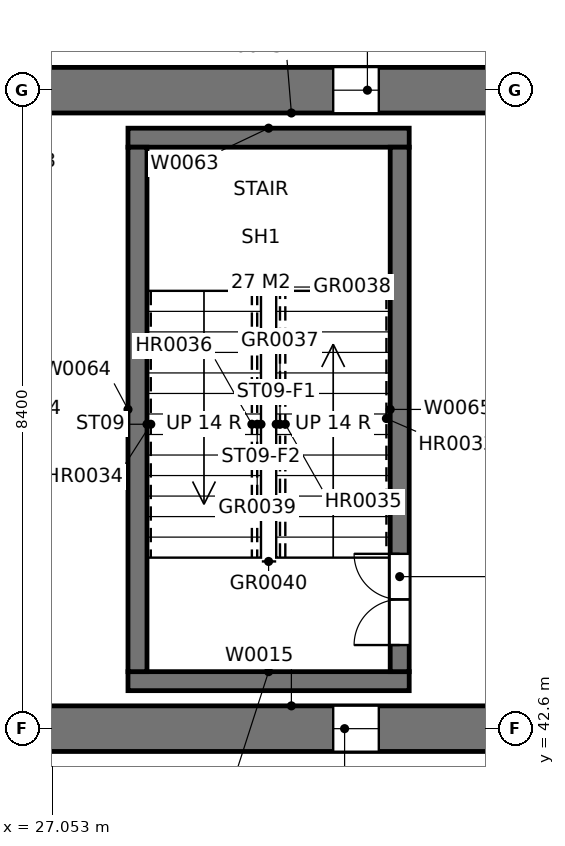
"""IFC4 building model, lengths in metres.
Left out: names, types, materials, properties, quantities, classifications, styles, units other than length and angle.
Written with IfcOpenShell. Run it as: python <this file> out.ifc"""

import sys

from ifc_helpers import new_model, si_unit, direction, frame, frame_2d, origin, place, context, subcontext, project, spatial, rectangle, extrude, element, fill, save


model = new_model("IFC4")
c1 = context("Model", 3, precision=1e-05, world=origin(), true_north=direction((0.0, 1.0)))
c2 = subcontext(c1, "Body", "Model", "MODEL_VIEW")
j1 = project(units=[si_unit("LENGTHUNIT", "METRE"), si_unit("PLANEANGLEUNIT", "RADIAN")], contexts=[c1])
p1 = place(None, origin())
s1 = spatial("IfcSite", under=j1, at=p1, CompositionType="ELEMENT")
p2 = place(p1, origin())
s2 = spatial("IfcBuilding", under=s1, at=p2, CompositionType="ELEMENT")
p3 = place(p2, frame((0.0, 0.0, 14.4)))
s3 = spatial("IfcBuildingStorey", under=s2, at=p3, CompositionType="ELEMENT", Elevation=14.4)
p4 = place(p3, frame((33.9, 51.0, 0.0), z_axis=(0.0, 0.0, 1.0), x_axis=(-1.0, 0.0, 0.0)))
e1 = element("IfcWall", 1, at=p4, inside=s3, PredefinedType="SOLIDWALL", context=c2, shape_type="SweptSolid", body=[
    extrude(rectangle(XDim=7.4, YDim=0.6, at=frame_2d((3.7, 0.0))), origin(), (0.0, 0.0, 1.0), 4.8),
])
p5 = place(p4, frame((2.55, 0.0, 1.5)))
e2 = element("IfcOpeningElement", 2, at=p5, cuts=e1, PredefinedType="OPENING", context=c2, shape_type="SweptSolid", body=[
    extrude(rectangle(XDim=0.6, YDim=1.8, at=frame_2d((0.3, 0.9))), frame((0.0, 0.31, 0.0), z_axis=(0.0, -1.0, 0.0), x_axis=(1.0, 0.0, 0.0)), (0.0, 0.0, 1.0), 0.62),
])
p6 = place(p3, frame((26.5, 42.6, 0.0), z_axis=(0.0, 0.0, 1.0), x_axis=(1.0, 0.0, 0.0)))
e3 = element("IfcWall", 3, at=p6, inside=s3, PredefinedType="SOLIDWALL", context=c2, shape_type="SweptSolid", body=[
    extrude(rectangle(XDim=7.4, YDim=0.6, at=frame_2d((3.7, 0.0))), origin(), (0.0, 0.0, 1.0), 4.8),
])
p7 = place(p6, frame((4.25, 0.0, 1.5)))
e4 = element("IfcOpeningElement", 4, at=p7, cuts=e3, PredefinedType="OPENING", context=c2, shape_type="SweptSolid", body=[
    extrude(rectangle(XDim=0.6, YDim=1.8, at=frame_2d((0.3, 0.9))), frame((0.0, 0.31, 0.0), z_axis=(0.0, -1.0, 0.0), x_axis=(1.0, 0.0, 0.0)), (0.0, 0.0, 1.0), 0.62),
])
for number, where, z_axis, x_axis in (
    (5, (28.05, 43.225, 0.0), (0.0, 0.0, 1.0), (1.0, 0.0, 0.0)),
    (6, (28.05, 50.375, 0.0), (0.0, 0.0, 1.0), (1.0, 0.0, 0.0)),
):
    element("IfcWall", number, at=place(p3, frame(where, z_axis=z_axis, x_axis=x_axis)), inside=s3, PredefinedType="SOLIDWALL", context=c2, shape_type="SweptSolid", body=[
        extrude(rectangle(XDim=3.7, YDim=0.25, at=frame_2d((1.85, 0.0))), origin(), (0.0, 0.0, 1.0), 4.8),
    ])
p8 = place(p3, frame((28.175, 43.35, 0.0), z_axis=(0.0, 0.0, 1.0), x_axis=(0.0, 1.0, 0.0)))
e7 = element("IfcWall", 7, at=p8, inside=s3, PredefinedType="SOLIDWALL", context=c2, shape_type="SweptSolid", body=[
    extrude(rectangle(XDim=6.9, YDim=0.25, at=frame_2d((3.45, 0.0))), origin(), (0.0, 0.0, 1.0), 4.8),
])
p9 = place(p3, frame((31.625, 43.35, 0.0), z_axis=(0.0, 0.0, 1.0), x_axis=(0.0, 1.0, 0.0)))
e8 = element("IfcWall", 8, at=p9, inside=s3, PredefinedType="SOLIDWALL", context=c2, shape_type="SweptSolid", body=[
    extrude(rectangle(XDim=6.9, YDim=0.25, at=frame_2d((3.45, 0.0))), origin(), (0.0, 0.0, 1.0), 4.8),
])
p10 = place(p9, frame((0.35, 0.0, 0.0)))
e9 = element("IfcOpeningElement", 9, at=p10, cuts=e8, PredefinedType="OPENING", context=c2, shape_type="SweptSolid", body=[
    extrude(rectangle(XDim=1.2, YDim=2.1, at=frame_2d((0.6, 1.05))), frame((0.0, 0.135, 0.0), z_axis=(0.0, -1.0, 0.0), x_axis=(1.0, 0.0, 0.0)), (0.0, 0.0, 1.0), 0.27),
])
p11 = place(p10, origin())
e10 = element("IfcDoor", 10, at=p11, inside=s3, OperationType="DOUBLE_DOOR_SINGLE_SWING", PredefinedType="DOOR", context=c2, shape_type="SweptSolid", body=[
    extrude(rectangle(XDim=1.2, YDim=2.1, at=frame_2d((0.6, 1.05))), frame((0.0, 0.025, 0.0), z_axis=(0.0, -1.0, 0.0), x_axis=(1.0, 0.0, 0.0)), (0.0, 0.0, 1.0), 0.05),
])
fill(e9, e10)
p12 = place(p5, origin())
e11 = element("IfcWindow", 11, at=p12, inside=s3, PartitioningType="SINGLE_PANEL", PredefinedType="WINDOW", context=c2, shape_type="SweptSolid", body=[
    extrude(rectangle(XDim=0.6, YDim=1.8, at=frame_2d((0.3, 0.9))), frame((0.0, 0.01, 0.0), z_axis=(0.0, -1.0, 0.0), x_axis=(1.0, 0.0, 0.0)), (0.0, 0.0, 1.0), 0.06),
])
fill(e2, e11)
p13 = place(p7, origin())
e12 = element("IfcWindow", 12, at=p13, inside=s3, PartitioningType="SINGLE_PANEL", PredefinedType="WINDOW", context=c2, shape_type="SweptSolid", body=[
    extrude(rectangle(XDim=0.6, YDim=1.8, at=frame_2d((0.3, 0.9))), frame((0.0, 0.01, 0.0), z_axis=(0.0, -1.0, 0.0), x_axis=(1.0, 0.0, 0.0)), (0.0, 0.0, 1.0), 0.06),
])
fill(e4, e12)
save(model, sys.argv[1])
